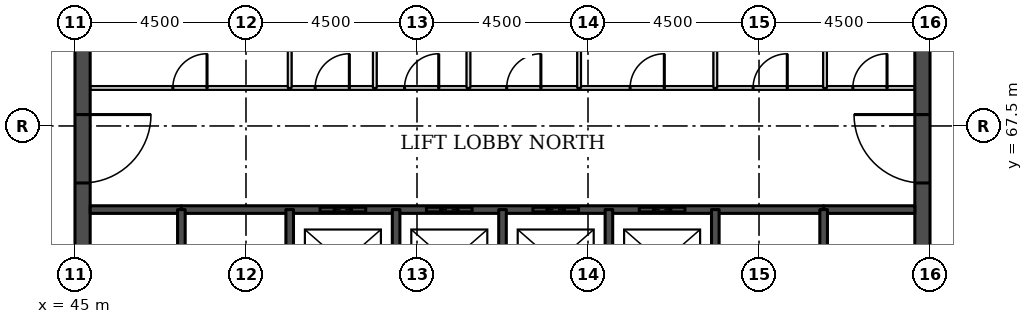
"""IFC4 building model, lengths in metres.
Left out: names, types, materials, properties, quantities, classifications, styles, units other than length and angle.
Written with IfcOpenShell. Run it as: python <this file> out.ifc"""

import sys

from ifc_helpers import new_model, si_unit, direction, frame, frame_2d, origin, place, context, subcontext, project, spatial, rectangle, extrude, element, fill, save


model = new_model("IFC4")
c1 = context("Model", 3, precision=1e-05, world=origin(), true_north=direction((0.0, 1.0)))
c2 = subcontext(c1, "Body", "Model", "MODEL_VIEW")
j1 = project(units=[si_unit("LENGTHUNIT", "METRE"), si_unit("PLANEANGLEUNIT", "RADIAN")], contexts=[c1])
p1 = place(None, origin())
s1 = spatial("IfcSite", under=j1, at=p1, CompositionType="ELEMENT")
p2 = place(p1, origin())
s2 = spatial("IfcBuilding", under=s1, at=p2, CompositionType="ELEMENT")
p3 = place(p2, frame((0.0, 0.0, 162.5)))
s3 = spatial("IfcBuildingStorey", under=s2, at=p3, CompositionType="ELEMENT", Elevation=162.5)
p4 = place(p3, frame((45.2, 49.5, 0.0), z_axis=(0.0, 0.0, 1.0), x_axis=(0.0, 1.0, 0.0)))
e1 = element("IfcWall", 1, at=p4, inside=s3, PredefinedType="SHEAR", context=c2, shape_type="SweptSolid", body=[
    extrude(rectangle(XDim=22.5, YDim=0.4, at=frame_2d((11.25, 0.0))), origin(), (0.0, 0.0, 1.0), 3.7),
])
p5 = place(p4, frame((4.2, 0.0, 0.0)))
e2 = element("IfcOpeningElement", 2, at=p5, cuts=e1, PredefinedType="OPENING", context=c2, shape_type="SweptSolid", body=[
    extrude(rectangle(XDim=1.8, YDim=2.1, at=frame_2d((0.9, 1.05))), frame((0.0, 0.21, 0.0), z_axis=(0.0, -1.0, 0.0), x_axis=(1.0, 0.0, 0.0)), (0.0, 0.0, 1.0), 0.42),
])
p6 = place(p4, frame((6.9, 0.0, 0.0)))
e3 = element("IfcOpeningElement", 3, at=p6, cuts=e1, PredefinedType="OPENING", context=c2, shape_type="SweptSolid", body=[
    extrude(rectangle(XDim=1.1, YDim=2.1, at=frame_2d((0.55, 1.05))), frame((0.0, 0.21, 0.0), z_axis=(0.0, -1.0, 0.0), x_axis=(1.0, 0.0, 0.0)), (0.0, 0.0, 1.0), 0.42),
])
p7 = place(p4, frame((13.6, 0.0, 0.0)))
e4 = element("IfcOpeningElement", 4, at=p7, cuts=e1, PredefinedType="OPENING", context=c2, shape_type="SweptSolid", body=[
    extrude(rectangle(XDim=1.1, YDim=2.1, at=frame_2d((0.55, 1.05))), frame((0.0, 0.21, 0.0), z_axis=(0.0, -1.0, 0.0), x_axis=(1.0, 0.0, 0.0)), (0.0, 0.0, 1.0), 0.42),
])
p8 = place(p4, frame((16.5, 0.0, 0.0)))
e5 = element("IfcOpeningElement", 5, at=p8, cuts=e1, PredefinedType="OPENING", context=c2, shape_type="SweptSolid", body=[
    extrude(rectangle(XDim=1.8, YDim=2.1, at=frame_2d((0.9, 1.05))), frame((0.0, 0.21, 0.0), z_axis=(0.0, -1.0, 0.0), x_axis=(1.0, 0.0, 0.0)), (0.0, 0.0, 1.0), 0.42),
])
p9 = place(p3, frame((67.3, 49.5, 0.0), z_axis=(0.0, 0.0, 1.0), x_axis=(0.0, 1.0, 0.0)))
e6 = element("IfcWall", 6, at=p9, inside=s3, PredefinedType="SHEAR", context=c2, shape_type="SweptSolid", body=[
    extrude(rectangle(XDim=22.5, YDim=0.4, at=frame_2d((11.25, 0.0))), origin(), (0.0, 0.0, 1.0), 3.7),
])
p10 = place(p9, frame((4.2, 0.0, 0.0)))
e7 = element("IfcOpeningElement", 7, at=p10, cuts=e6, PredefinedType="OPENING", context=c2, shape_type="SweptSolid", body=[
    extrude(rectangle(XDim=1.8, YDim=2.1, at=frame_2d((0.9, 1.05))), frame((0.0, 0.21, 0.0), z_axis=(0.0, -1.0, 0.0), x_axis=(1.0, 0.0, 0.0)), (0.0, 0.0, 1.0), 0.42),
])
p11 = place(p9, frame((6.9, 0.0, 0.0)))
e8 = element("IfcOpeningElement", 8, at=p11, cuts=e6, PredefinedType="OPENING", context=c2, shape_type="SweptSolid", body=[
    extrude(rectangle(XDim=1.1, YDim=2.1, at=frame_2d((0.55, 1.05))), frame((0.0, 0.21, 0.0), z_axis=(0.0, -1.0, 0.0), x_axis=(1.0, 0.0, 0.0)), (0.0, 0.0, 1.0), 0.42),
])
p12 = place(p9, frame((13.6, 0.0, 0.0)))
e9 = element("IfcOpeningElement", 9, at=p12, cuts=e6, PredefinedType="OPENING", context=c2, shape_type="SweptSolid", body=[
    extrude(rectangle(XDim=1.1, YDim=2.1, at=frame_2d((0.55, 1.05))), frame((0.0, 0.21, 0.0), z_axis=(0.0, -1.0, 0.0), x_axis=(1.0, 0.0, 0.0)), (0.0, 0.0, 1.0), 0.42),
])
p13 = place(p9, frame((16.5, 0.0, 0.0)))
e10 = element("IfcOpeningElement", 10, at=p13, cuts=e6, PredefinedType="OPENING", context=c2, shape_type="SweptSolid", body=[
    extrude(rectangle(XDim=1.8, YDim=2.1, at=frame_2d((0.9, 1.05))), frame((0.0, 0.21, 0.0), z_axis=(0.0, -1.0, 0.0), x_axis=(1.0, 0.0, 0.0)), (0.0, 0.0, 1.0), 0.42),
])
for number, where, z_axis, x_axis in (
    (11, (45.4, 65.3, 0.0), (0.0, 0.0, 1.0), (1.0, 0.0, 0.0)),
    (12, (64.7, 65.3, 0.0), (0.0, 0.0, 1.0), (1.0, 0.0, 0.0)),
):
    element("IfcWall", number, at=place(p3, frame(where, z_axis=z_axis, x_axis=x_axis)), inside=s3, PredefinedType="SOLIDWALL", context=c2, shape_type="SweptSolid", body=[
        extrude(rectangle(XDim=2.4, YDim=0.2, at=frame_2d((1.2, 0.0))), origin(), (0.0, 0.0, 1.0), 3.55),
    ])
p14 = place(p3, frame((47.8, 65.3, 0.0), z_axis=(0.0, 0.0, 1.0), x_axis=(1.0, 0.0, 0.0)))
e13 = element("IfcWall", 13, at=p14, inside=s3, PredefinedType="SOLIDWALL", context=c2, shape_type="SweptSolid", body=[
    extrude(rectangle(XDim=16.9, YDim=0.2, at=frame_2d((8.45, 0.0))), origin(), (0.0, 0.0, 1.0), 3.55),
])
p15 = place(p14, frame((3.65, 0.0, 0.0)))
e14 = element("IfcOpeningElement", 14, at=p15, cuts=e13, PredefinedType="OPENING", context=c2, shape_type="SweptSolid", body=[
    extrude(rectangle(XDim=1.2, YDim=2.1, at=frame_2d((0.6, 1.05))), frame((0.0, 0.11, 0.0), z_axis=(0.0, -1.0, 0.0), x_axis=(1.0, 0.0, 0.0)), (0.0, 0.0, 1.0), 0.22),
])
p16 = place(p14, frame((6.45, 0.0, 0.0)))
e15 = element("IfcOpeningElement", 15, at=p16, cuts=e13, PredefinedType="OPENING", context=c2, shape_type="SweptSolid", body=[
    extrude(rectangle(XDim=1.2, YDim=2.1, at=frame_2d((0.6, 1.05))), frame((0.0, 0.11, 0.0), z_axis=(0.0, -1.0, 0.0), x_axis=(1.0, 0.0, 0.0)), (0.0, 0.0, 1.0), 0.22),
])
p17 = place(p14, frame((9.25, 0.0, 0.0)))
e16 = element("IfcOpeningElement", 16, at=p17, cuts=e13, PredefinedType="OPENING", context=c2, shape_type="SweptSolid", body=[
    extrude(rectangle(XDim=1.2, YDim=2.1, at=frame_2d((0.6, 1.05))), frame((0.0, 0.11, 0.0), z_axis=(0.0, -1.0, 0.0), x_axis=(1.0, 0.0, 0.0)), (0.0, 0.0, 1.0), 0.22),
])
p18 = place(p14, frame((12.05, 0.0, 0.0)))
e17 = element("IfcOpeningElement", 17, at=p18, cuts=e13, PredefinedType="OPENING", context=c2, shape_type="SweptSolid", body=[
    extrude(rectangle(XDim=1.2, YDim=2.1, at=frame_2d((0.6, 1.05))), frame((0.0, 0.11, 0.0), z_axis=(0.0, -1.0, 0.0), x_axis=(1.0, 0.0, 0.0)), (0.0, 0.0, 1.0), 0.22),
])
p19 = place(p3, frame((45.4, 68.5, 0.0), z_axis=(0.0, 0.0, 1.0), x_axis=(1.0, 0.0, 0.0)))
e18 = element("IfcWall", 18, at=p19, inside=s3, PredefinedType="PARTITIONING", context=c2, shape_type="SweptSolid", body=[
    extrude(rectangle(XDim=21.7, YDim=0.1, at=frame_2d((10.85, 0.0))), origin(), (0.0, 0.0, 1.0), 3.55),
])
p20 = place(p19, frame((20.069, 0.0, 0.0)))
e19 = element("IfcOpeningElement", 19, at=p20, cuts=e18, PredefinedType="OPENING", context=c2, shape_type="SweptSolid", body=[
    extrude(rectangle(XDim=0.9, YDim=2.1, at=frame_2d((0.45, 1.05))), frame((0.0, 0.06, 0.0), z_axis=(0.0, -1.0, 0.0), x_axis=(1.0, 0.0, 0.0)), (0.0, 0.0, 1.0), 0.12),
])
p21 = place(p19, frame((17.444, 0.0, 0.0)))
e20 = element("IfcOpeningElement", 20, at=p21, cuts=e18, PredefinedType="OPENING", context=c2, shape_type="SweptSolid", body=[
    extrude(rectangle(XDim=0.9, YDim=2.1, at=frame_2d((0.45, 1.05))), frame((0.0, 0.06, 0.0), z_axis=(0.0, -1.0, 0.0), x_axis=(1.0, 0.0, 0.0)), (0.0, 0.0, 1.0), 0.12),
])
p22 = place(p19, frame((2.175, 0.0, 0.0)))
e21 = element("IfcOpeningElement", 21, at=p22, cuts=e18, PredefinedType="OPENING", context=c2, shape_type="SweptSolid", body=[
    extrude(rectangle(XDim=0.9, YDim=2.1, at=frame_2d((0.45, 1.05))), frame((0.0, 0.06, 0.0), z_axis=(0.0, -1.0, 0.0), x_axis=(1.0, 0.0, 0.0)), (0.0, 0.0, 1.0), 0.12),
])
p23 = place(p19, frame((14.208, 0.0, 0.0)))
e22 = element("IfcOpeningElement", 22, at=p23, cuts=e18, PredefinedType="OPENING", context=c2, shape_type="SweptSolid", body=[
    extrude(rectangle(XDim=0.9, YDim=2.1, at=frame_2d((0.45, 1.05))), frame((0.0, 0.06, 0.0), z_axis=(0.0, -1.0, 0.0), x_axis=(1.0, 0.0, 0.0)), (0.0, 0.0, 1.0), 0.12),
])
p24 = place(p19, frame((10.96, 0.0, 0.0)))
e23 = element("IfcOpeningElement", 23, at=p24, cuts=e18, PredefinedType="OPENING", context=c2, shape_type="SweptSolid", body=[
    extrude(rectangle(XDim=0.9, YDim=2.1, at=frame_2d((0.45, 1.05))), frame((0.0, 0.06, 0.0), z_axis=(0.0, -1.0, 0.0), x_axis=(1.0, 0.0, 0.0)), (0.0, 0.0, 1.0), 0.12),
])
p25 = place(p19, frame((8.272, 0.0, 0.0)))
e24 = element("IfcOpeningElement", 24, at=p25, cuts=e18, PredefinedType="OPENING", context=c2, shape_type="SweptSolid", body=[
    extrude(rectangle(XDim=0.9, YDim=2.1, at=frame_2d((0.45, 1.05))), frame((0.0, 0.06, 0.0), z_axis=(0.0, -1.0, 0.0), x_axis=(1.0, 0.0, 0.0)), (0.0, 0.0, 1.0), 0.12),
])
p26 = place(p19, frame((5.92, 0.0, 0.0)))
e25 = element("IfcOpeningElement", 25, at=p26, cuts=e18, PredefinedType="OPENING", context=c2, shape_type="SweptSolid", body=[
    extrude(rectangle(XDim=0.9, YDim=2.1, at=frame_2d((0.45, 1.05))), frame((0.0, 0.06, 0.0), z_axis=(0.0, -1.0, 0.0), x_axis=(1.0, 0.0, 0.0)), (0.0, 0.0, 1.0), 0.12),
])
p27 = place(p3, frame((47.8, 62.0, 0.0), z_axis=(0.0, 0.0, 1.0), x_axis=(0.0, 1.0, 0.0)))
e26 = element("IfcWall", 26, at=p27, inside=s3, PredefinedType="SOLIDWALL", context=c2, shape_type="SweptSolid", body=[
    extrude(rectangle(XDim=3.3, YDim=0.2, at=frame_2d((1.65, 0.0))), origin(), (0.0, 0.0, 1.0), 3.55),
])
p28 = place(p27, frame((1.1, 0.0, 0.0)))
e27 = element("IfcOpeningElement", 27, at=p28, cuts=e26, PredefinedType="OPENING", context=c2, shape_type="SweptSolid", body=[
    extrude(rectangle(XDim=1.1, YDim=2.1, at=frame_2d((0.55, 1.05))), frame((0.0, 0.11, 0.0), z_axis=(0.0, -1.0, 0.0), x_axis=(1.0, 0.0, 0.0)), (0.0, 0.0, 1.0), 0.22),
])
p29 = place(p3, frame((50.65, 68.5, 0.0), z_axis=(0.0, 0.0, 1.0), x_axis=(0.0, 1.0, 0.0)))
e28 = element("IfcWall", 28, at=p29, inside=s3, PredefinedType="PARTITIONING", context=c2, shape_type="SweptSolid", body=[
    extrude(rectangle(XDim=3.1, YDim=0.1, at=frame_2d((1.55, 0.0))), origin(), (0.0, 0.0, 1.0), 3.55),
])
p30 = place(p3, frame((50.65, 62.0, 0.0), z_axis=(0.0, 0.0, 1.0), x_axis=(0.0, 1.0, 0.0)))
e29 = element("IfcWall", 29, at=p30, inside=s3, PredefinedType="SOLIDWALL", context=c2, shape_type="SweptSolid", body=[
    extrude(rectangle(XDim=3.3, YDim=0.2, at=frame_2d((1.65, 0.0))), origin(), (0.0, 0.0, 1.0), 3.55),
])
p31 = place(p3, frame((52.89, 68.5, 0.0), z_axis=(0.0, 0.0, 1.0), x_axis=(0.0, 1.0, 0.0)))
e30 = element("IfcWall", 30, at=p31, inside=s3, PredefinedType="PARTITIONING", context=c2, shape_type="SweptSolid", body=[
    extrude(rectangle(XDim=3.1, YDim=0.1, at=frame_2d((1.55, 0.0))), origin(), (0.0, 0.0, 1.0), 3.55),
])
p32 = place(p3, frame((53.45, 62.5, 0.0), z_axis=(0.0, 0.0, 1.0), x_axis=(0.0, 1.0, 0.0)))
e31 = element("IfcWall", 31, at=p32, inside=s3, PredefinedType="SOLIDWALL", context=c2, shape_type="SweptSolid", body=[
    extrude(rectangle(XDim=2.8, YDim=0.2, at=frame_2d((1.4, 0.0))), origin(), (0.0, 0.0, 1.0), 3.55),
])
p33 = place(p3, frame((55.354, 68.5, 0.0), z_axis=(0.0, 0.0, 1.0), x_axis=(0.0, 1.0, 0.0)))
e32 = element("IfcWall", 32, at=p33, inside=s3, PredefinedType="PARTITIONING", context=c2, shape_type="SweptSolid", body=[
    extrude(rectangle(XDim=3.1, YDim=0.1, at=frame_2d((1.55, 0.0))), origin(), (0.0, 0.0, 1.0), 3.55),
])
p34 = place(p3, frame((56.25, 62.5, 0.0), z_axis=(0.0, 0.0, 1.0), x_axis=(0.0, 1.0, 0.0)))
e33 = element("IfcWall", 33, at=p34, inside=s3, PredefinedType="SOLIDWALL", context=c2, shape_type="SweptSolid", body=[
    extrude(rectangle(XDim=2.8, YDim=0.2, at=frame_2d((1.4, 0.0))), origin(), (0.0, 0.0, 1.0), 3.55),
])
p35 = place(p3, frame((58.266, 68.5, 0.0), z_axis=(0.0, 0.0, 1.0), x_axis=(0.0, 1.0, 0.0)))
e34 = element("IfcWall", 34, at=p35, inside=s3, PredefinedType="PARTITIONING", context=c2, shape_type="SweptSolid", body=[
    extrude(rectangle(XDim=3.1, YDim=0.1, at=frame_2d((1.55, 0.0))), origin(), (0.0, 0.0, 1.0), 3.55),
])
p36 = place(p3, frame((59.05, 62.5, 0.0), z_axis=(0.0, 0.0, 1.0), x_axis=(0.0, 1.0, 0.0)))
e35 = element("IfcWall", 35, at=p36, inside=s3, PredefinedType="SOLIDWALL", context=c2, shape_type="SweptSolid", body=[
    extrude(rectangle(XDim=2.8, YDim=0.2, at=frame_2d((1.4, 0.0))), origin(), (0.0, 0.0, 1.0), 3.55),
])
p37 = place(p3, frame((61.85, 68.5, 0.0), z_axis=(0.0, 0.0, 1.0), x_axis=(0.0, 1.0, 0.0)))
e36 = element("IfcWall", 36, at=p37, inside=s3, PredefinedType="PARTITIONING", context=c2, shape_type="SweptSolid", body=[
    extrude(rectangle(XDim=3.1, YDim=0.1, at=frame_2d((1.55, 0.0))), origin(), (0.0, 0.0, 1.0), 3.55),
])
p38 = place(p3, frame((61.85, 62.0, 0.0), z_axis=(0.0, 0.0, 1.0), x_axis=(0.0, 1.0, 0.0)))
e37 = element("IfcWall", 37, at=p38, inside=s3, PredefinedType="SOLIDWALL", context=c2, shape_type="SweptSolid", body=[
    extrude(rectangle(XDim=3.3, YDim=0.2, at=frame_2d((1.65, 0.0))), origin(), (0.0, 0.0, 1.0), 3.55),
])
p39 = place(p3, frame((64.7, 62.0, 0.0), z_axis=(0.0, 0.0, 1.0), x_axis=(0.0, 1.0, 0.0)))
e38 = element("IfcWall", 38, at=p39, inside=s3, PredefinedType="SOLIDWALL", context=c2, shape_type="SweptSolid", body=[
    extrude(rectangle(XDim=3.3, YDim=0.2, at=frame_2d((1.65, 0.0))), origin(), (0.0, 0.0, 1.0), 3.55),
])
p40 = place(p39, frame((1.1, 0.0, 0.0)))
e39 = element("IfcOpeningElement", 39, at=p40, cuts=e38, PredefinedType="OPENING", context=c2, shape_type="SweptSolid", body=[
    extrude(rectangle(XDim=1.1, YDim=2.1, at=frame_2d((0.55, 1.05))), frame((0.0, 0.11, 0.0), z_axis=(0.0, -1.0, 0.0), x_axis=(1.0, 0.0, 0.0)), (0.0, 0.0, 1.0), 0.22),
])
p41 = place(p3, frame((64.738, 68.5, 0.0), z_axis=(0.0, 0.0, 1.0), x_axis=(0.0, 1.0, 0.0)))
e40 = element("IfcWall", 40, at=p41, inside=s3, PredefinedType="PARTITIONING", context=c2, shape_type="SweptSolid", body=[
    extrude(rectangle(XDim=3.1, YDim=0.1, at=frame_2d((1.55, 0.0))), origin(), (0.0, 0.0, 1.0), 3.55),
])
p42 = place(p15, origin())
e41 = element("IfcDoor", 41, at=p42, inside=s3, OperationType="DOUBLE_DOOR_SLIDING", PredefinedType="DOOR", context=c2, shape_type="SweptSolid", body=[
    extrude(rectangle(XDim=1.2, YDim=2.1, at=frame_2d((0.6, 1.05))), frame((0.0, 0.025, 0.0), z_axis=(0.0, -1.0, 0.0), x_axis=(1.0, 0.0, 0.0)), (0.0, 0.0, 1.0), 0.05),
])
fill(e14, e41)
p43 = place(p16, origin())
e42 = element("IfcDoor", 42, at=p43, inside=s3, OperationType="DOUBLE_DOOR_SLIDING", PredefinedType="DOOR", context=c2, shape_type="SweptSolid", body=[
    extrude(rectangle(XDim=1.2, YDim=2.1, at=frame_2d((0.6, 1.05))), frame((0.0, 0.025, 0.0), z_axis=(0.0, -1.0, 0.0), x_axis=(1.0, 0.0, 0.0)), (0.0, 0.0, 1.0), 0.05),
])
fill(e15, e42)
p44 = place(p17, origin())
e43 = element("IfcDoor", 43, at=p44, inside=s3, OperationType="DOUBLE_DOOR_SLIDING", PredefinedType="DOOR", context=c2, shape_type="SweptSolid", body=[
    extrude(rectangle(XDim=1.2, YDim=2.1, at=frame_2d((0.6, 1.05))), frame((0.0, 0.025, 0.0), z_axis=(0.0, -1.0, 0.0), x_axis=(1.0, 0.0, 0.0)), (0.0, 0.0, 1.0), 0.05),
])
fill(e16, e43)
p45 = place(p18, origin())
e44 = element("IfcDoor", 44, at=p45, inside=s3, OperationType="DOUBLE_DOOR_SLIDING", PredefinedType="DOOR", context=c2, shape_type="SweptSolid", body=[
    extrude(rectangle(XDim=1.2, YDim=2.1, at=frame_2d((0.6, 1.05))), frame((0.0, 0.025, 0.0), z_axis=(0.0, -1.0, 0.0), x_axis=(1.0, 0.0, 0.0)), (0.0, 0.0, 1.0), 0.05),
])
fill(e17, e44)
p46 = place(p8, frame((1.8, 0.0, 0.0), z_axis=(0.0, 0.0, 1.0), x_axis=(-1.0, 0.0, 0.0)))
e45 = element("IfcDoor", 45, at=p46, inside=s3, OperationType="SINGLE_SWING_LEFT", PredefinedType="DOOR", context=c2, shape_type="SweptSolid", body=[
    extrude(rectangle(XDim=1.8, YDim=2.1, at=frame_2d((0.9, 1.05))), frame((0.0, 0.025, 0.0), z_axis=(0.0, -1.0, 0.0), x_axis=(1.0, 0.0, 0.0)), (0.0, 0.0, 1.0), 0.05),
])
fill(e5, e45)
p47 = place(p13, origin())
e46 = element("IfcDoor", 46, at=p47, inside=s3, OperationType="SINGLE_SWING_RIGHT", PredefinedType="DOOR", context=c2, shape_type="SweptSolid", body=[
    extrude(rectangle(XDim=1.8, YDim=2.1, at=frame_2d((0.9, 1.05))), frame((0.0, 0.025, 0.0), z_axis=(0.0, -1.0, 0.0), x_axis=(1.0, 0.0, 0.0)), (0.0, 0.0, 1.0), 0.05),
])
fill(e10, e46)
p48 = place(p20, origin())
e47 = element("IfcDoor", 47, at=p48, inside=s3, OperationType="SINGLE_SWING_RIGHT", PredefinedType="DOOR", context=c2, shape_type="SweptSolid", body=[
    extrude(rectangle(XDim=0.9, YDim=2.1, at=frame_2d((0.45, 1.05))), frame((0.0, 0.025, 0.0), z_axis=(0.0, -1.0, 0.0), x_axis=(1.0, 0.0, 0.0)), (0.0, 0.0, 1.0), 0.05),
])
fill(e19, e47)
p49 = place(p21, origin())
e48 = element("IfcDoor", 48, at=p49, inside=s3, OperationType="SINGLE_SWING_RIGHT", PredefinedType="DOOR", context=c2, shape_type="SweptSolid", body=[
    extrude(rectangle(XDim=0.9, YDim=2.1, at=frame_2d((0.45, 1.05))), frame((0.0, 0.025, 0.0), z_axis=(0.0, -1.0, 0.0), x_axis=(1.0, 0.0, 0.0)), (0.0, 0.0, 1.0), 0.05),
])
fill(e20, e48)
p50 = place(p22, origin())
e49 = element("IfcDoor", 49, at=p50, inside=s3, OperationType="SINGLE_SWING_RIGHT", PredefinedType="DOOR", context=c2, shape_type="SweptSolid", body=[
    extrude(rectangle(XDim=0.9, YDim=2.1, at=frame_2d((0.45, 1.05))), frame((0.0, 0.025, 0.0), z_axis=(0.0, -1.0, 0.0), x_axis=(1.0, 0.0, 0.0)), (0.0, 0.0, 1.0), 0.05),
])
fill(e21, e49)
p51 = place(p23, origin())
e50 = element("IfcDoor", 50, at=p51, inside=s3, OperationType="SINGLE_SWING_RIGHT", PredefinedType="DOOR", context=c2, shape_type="SweptSolid", body=[
    extrude(rectangle(XDim=0.9, YDim=2.1, at=frame_2d((0.45, 1.05))), frame((0.0, 0.025, 0.0), z_axis=(0.0, -1.0, 0.0), x_axis=(1.0, 0.0, 0.0)), (0.0, 0.0, 1.0), 0.05),
])
fill(e22, e50)
p52 = place(p24, origin())
e51 = element("IfcDoor", 51, at=p52, inside=s3, OperationType="SINGLE_SWING_RIGHT", PredefinedType="DOOR", context=c2, shape_type="SweptSolid", body=[
    extrude(rectangle(XDim=0.9, YDim=2.1, at=frame_2d((0.45, 1.05))), frame((0.0, 0.025, 0.0), z_axis=(0.0, -1.0, 0.0), x_axis=(1.0, 0.0, 0.0)), (0.0, 0.0, 1.0), 0.05),
])
fill(e23, e51)
p53 = place(p25, origin())
e52 = element("IfcDoor", 52, at=p53, inside=s3, OperationType="SINGLE_SWING_RIGHT", PredefinedType="DOOR", context=c2, shape_type="SweptSolid", body=[
    extrude(rectangle(XDim=0.9, YDim=2.1, at=frame_2d((0.45, 1.05))), frame((0.0, 0.025, 0.0), z_axis=(0.0, -1.0, 0.0), x_axis=(1.0, 0.0, 0.0)), (0.0, 0.0, 1.0), 0.05),
])
fill(e24, e52)
p54 = place(p26, origin())
e53 = element("IfcDoor", 53, at=p54, inside=s3, OperationType="SINGLE_SWING_RIGHT", PredefinedType="DOOR", context=c2, shape_type="SweptSolid", body=[
    extrude(rectangle(XDim=0.9, YDim=2.1, at=frame_2d((0.45, 1.05))), frame((0.0, 0.025, 0.0), z_axis=(0.0, -1.0, 0.0), x_axis=(1.0, 0.0, 0.0)), (0.0, 0.0, 1.0), 0.05),
])
fill(e25, e53)
save(model, sys.argv[1])
